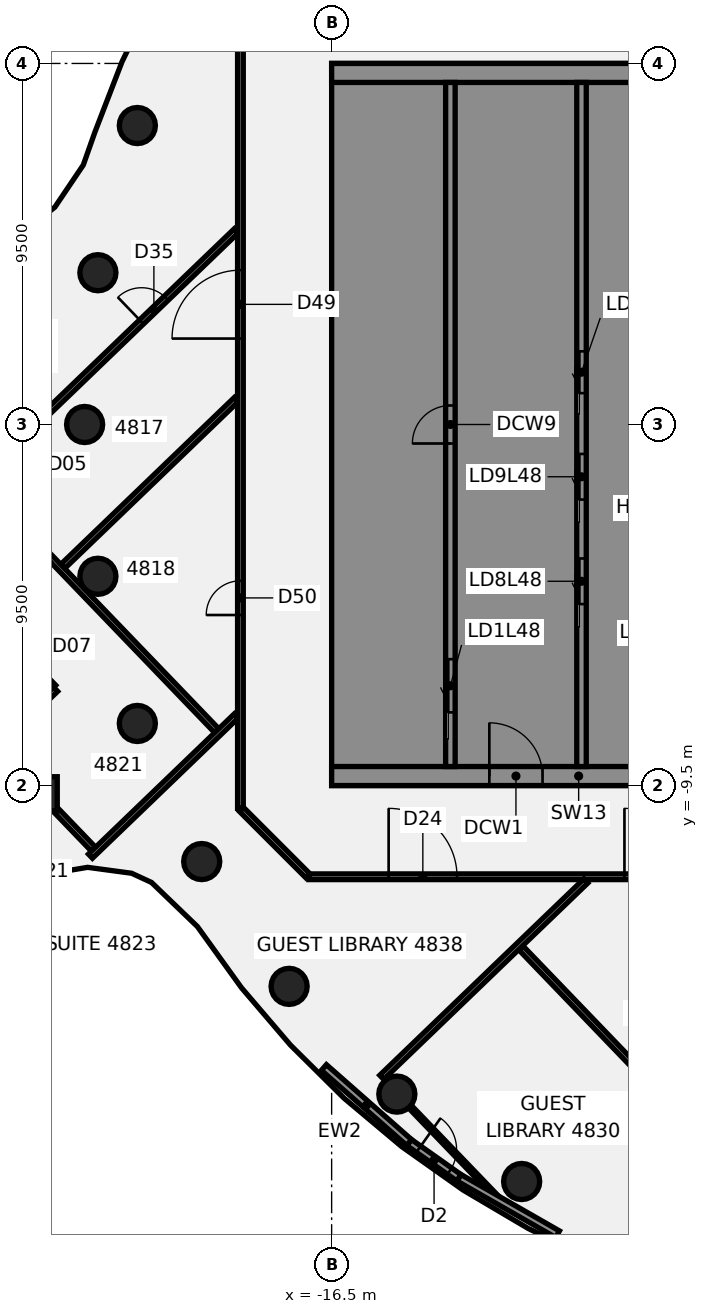
"""IFC4 building model, lengths in metres.
Left out: names, types, materials, properties, quantities, classifications, styles, units other than length and angle.
Written with IfcOpenShell. Run it as: python <this file> out.ifc"""

import sys

from ifc_helpers import new_model, si_unit, direction, frame, frame_2d, origin, origin_2d, place, context, subcontext, project, spatial, polyline, rectangle, circle, outline, extrude, element, fill, save


model = new_model("IFC4")
c1 = context("Model", 3, precision=1e-05, world=origin(), true_north=direction((0.0, 1.0)))
c2 = subcontext(c1, "Body", "Model", "MODEL_VIEW")
j1 = project(units=[si_unit("LENGTHUNIT", "METRE"), si_unit("PLANEANGLEUNIT", "RADIAN")], contexts=[c1])
p1 = place(None, origin())
s1 = spatial("IfcSite", under=j1, at=p1, CompositionType="ELEMENT")
p2 = place(p1, origin())
s2 = spatial("IfcBuilding", under=s1, at=p2, CompositionType="ELEMENT")
p3 = place(p2, frame((0.0, 0.0, 193.3)))
s3 = spatial("IfcBuildingStorey", under=s2, at=p3, CompositionType="ELEMENT", Elevation=193.3)
for number, where, z_axis, x_axis in (
    (1, (-21.613, 7.866, -0.14), (0.0, 0.0, 1.0), (1.0, 0.0, 0.0)),
    (2, (-22.651, 3.994, -0.14), (0.0, 0.0, 1.0), (1.0, 0.0, 0.0)),
    (3, (-23.0, 0.0, -0.14), (0.0, 0.0, 1.0), (1.0, 0.0, 0.0)),
    (4, (-22.651, -3.994, -0.14), (0.0, 0.0, 1.0), (1.0, 0.0, 0.0)),
    (5, (-21.613, -7.866, -0.14), (0.0, 0.0, 1.0), (1.0, 0.0, 0.0)),
    (6, (-19.919, -11.5, -0.14), (0.0, 0.0, 1.0), (1.0, 0.0, 0.0)),
    (7, (-17.619, -14.784, -0.14), (0.0, 0.0, 1.0), (1.0, 0.0, 0.0)),
    (8, (-14.784, -17.619, -0.14), (0.0, 0.0, 1.0), (1.0, 0.0, 0.0)),
    (9, (-11.5, -19.919, -0.14), (0.0, 0.0, 1.0), (1.0, 0.0, 0.0)),
):
    element("IfcColumn", number, at=place(p3, frame(where, z_axis=z_axis, x_axis=x_axis)), inside=s3, PredefinedType="COLUMN", context=c2, shape_type="SweptSolid", body=[
        extrude(circle(Radius=0.475, at=origin_2d()), origin(), (0.0, 0.0, 1.0), 3.6),
    ])
p4 = place(p3, frame((-24.17, -9.718, -0.139), z_axis=(0.04927561345, -0.010573584179, 0.998729249215), x_axis=(-0.691569981719, 0.721101561283, 0.041755223636)))
e10 = element("IfcColumn", 10, at=p4, inside=s3, PredefinedType="COLUMN", context=c2, shape_type="SweptSolid", body=[
    extrude(rectangle(XDim=0.9, YDim=0.9, at=origin_2d()), origin(), (0.0, 0.0, 1.0), 3.602),
])
p5 = place(p3, frame((-29.383, 2.194, 0.0), z_axis=(0.0, 0.0, 1.0), x_axis=(0.693158469728, -0.720785221716, 0.0)))
e11 = element("IfcWall", 11, at=p5, inside=s3, PredefinedType="PARTITIONING", context=c2, shape_type="SweptSolid", body=[
    extrude(rectangle(XDim=14.219, YDim=0.15, at=frame_2d((7.109, 0.0))), origin(), (0.0, 0.0, 1.0), 2.864),
])
p6 = place(p5, frame((5.799, 0.0, 0.0)))
e12 = element("IfcOpeningElement", 12, at=p6, cuts=e11, PredefinedType="OPENING", context=c2, shape_type="SweptSolid", body=[
    extrude(rectangle(XDim=1.4, YDim=2.1, at=frame_2d((0.7, 1.05))), frame((0.0, 0.085, 0.0), z_axis=(0.0, -1.0, 0.0), x_axis=(1.0, 0.0, 0.0)), (0.0, 0.0, 1.0), 0.17),
])
p7 = place(p3, frame((-23.748, -10.155, 0.0), z_axis=(0.0, 0.0, 1.0), x_axis=(0.693409155662, -0.720544060308, 0.0)))
e13 = element("IfcWall", 13, at=p7, inside=s3, PredefinedType="PARTITIONING", context=c2, shape_type="SweptSolid", body=[
    extrude(rectangle(XDim=1.413, YDim=0.15, at=frame_2d((0.706, 0.0))), origin(), (0.0, 0.0, 1.0), 2.864),
])
p8 = place(p3, frame((-25.51, -5.151, 0.0), z_axis=(0.0, 0.0, 1.0), x_axis=(0.69314064678, -0.720802361109, 0.0)))
e14 = element("IfcWall", 14, at=p8, inside=s3, PredefinedType="PARTITIONING", context=c2, shape_type="SweptSolid", body=[
    extrude(rectangle(XDim=2.445, YDim=0.15, at=frame_2d((1.222, 0.0))), origin(), (0.0, 0.0, 1.0), 2.864),
])
p9 = place(p8, frame((0.52, 0.0, 0.0)))
e15 = element("IfcOpeningElement", 15, at=p9, cuts=e14, PredefinedType="OPENING", context=c2, shape_type="SweptSolid", body=[
    extrude(rectangle(XDim=0.9, YDim=2.1, at=frame_2d((0.45, 1.05))), frame((0.0, 0.085, 0.0), z_axis=(0.0, -1.0, 0.0), x_axis=(1.0, 0.0, 0.0)), (0.0, 0.0, 1.0), 0.17),
])
p10 = place(p3, frame((-14.446, -17.943, 0.0), z_axis=(0.0, 0.0, 1.0), x_axis=(0.693080436315, -0.720860256081, 0.0)))
e16 = element("IfcWall", 16, at=p10, inside=s3, PredefinedType="PARTITIONING", context=c2, shape_type="SweptSolid", body=[
    extrude(rectangle(XDim=3.278, YDim=0.1, at=frame_2d((1.639, 0.0))), origin(), (0.0, 0.0, 1.0), 2.864),
])
p11 = place(p3, frame((-11.522, -13.769, 0.0), z_axis=(0.0, 0.0, 1.0), x_axis=(0.693150251381, -0.720793124974, 0.0)))
e17 = element("IfcWall", 17, at=p11, inside=s3, PredefinedType="PARTITIONING", context=c2, shape_type="SweptSolid", body=[
    extrude(rectangle(XDim=17.62, YDim=0.15, at=frame_2d((8.81, 0.0))), origin(), (0.0, 0.0, 1.0), 2.864),
])
p12 = place(p11, frame((9.22, 0.0, 0.0)))
e18 = element("IfcOpeningElement", 18, at=p12, cuts=e17, PredefinedType="OPENING", context=c2, shape_type="SweptSolid", body=[
    extrude(rectangle(XDim=1.8, YDim=2.1, at=frame_2d((0.9, 1.05))), frame((0.0, 0.085, 0.0), z_axis=(0.0, -1.0, 0.0), x_axis=(1.0, 0.0, 0.0)), (0.0, 0.0, 1.0), 0.17),
])
p13 = place(p3, frame((-18.872, -10.128, 0.0), z_axis=(0.0, 0.0, 1.0), x_axis=(0.707106781187, -0.707106781187, 0.0)))
e19 = element("IfcWall", 19, at=p13, inside=s3, PredefinedType="PARTITIONING", context=c2, shape_type="SweptSolid", body=[
    extrude(rectangle(XDim=2.465, YDim=0.15, at=frame_2d((1.232, 0.0))), origin(), (0.0, 0.0, 1.0), 2.864),
])
p14 = place(p3, frame((-17.1, -11.9, 0.0), z_axis=(0.0, 0.0, 1.0), x_axis=(1.0, 0.0, 0.0)))
e20 = element("IfcWall", 20, at=p14, inside=s3, PredefinedType="PARTITIONING", context=c2, shape_type="SweptSolid", body=[
    extrude(rectangle(XDim=34.165, YDim=0.15, at=frame_2d((17.083, 0.0))), origin(), (0.0, 0.0, 1.0), 2.864),
])
p15 = place(p14, frame((8.305, 0.0, 0.0)))
e21 = element("IfcOpeningElement", 21, at=p15, cuts=e20, PredefinedType="OPENING", context=c2, shape_type="SweptSolid", body=[
    extrude(rectangle(XDim=1.8, YDim=2.1, at=frame_2d((0.9, 1.05))), frame((0.0, 0.085, 0.0), z_axis=(0.0, -1.0, 0.0), x_axis=(1.0, 0.0, 0.0)), (0.0, 0.0, 1.0), 0.17),
])
p16 = place(p14, frame((2.1, 0.0, 0.0)))
e22 = element("IfcOpeningElement", 22, at=p16, cuts=e20, PredefinedType="OPENING", context=c2, shape_type="SweptSolid", body=[
    extrude(rectangle(XDim=1.8, YDim=2.1, at=frame_2d((0.9, 1.05))), frame((0.0, 0.085, 0.0), z_axis=(0.0, -1.0, 0.0), x_axis=(1.0, 0.0, 0.0)), (0.0, 0.0, 1.0), 0.17),
])
p17 = place(p14, frame((25.131, 0.0, 0.0)))
e23 = element("IfcOpeningElement", 23, at=p17, cuts=e20, PredefinedType="OPENING", context=c2, shape_type="SweptSolid", body=[
    extrude(rectangle(XDim=1.8, YDim=2.1, at=frame_2d((0.9, 1.05))), frame((0.0, 0.085, 0.0), z_axis=(0.0, -1.0, 0.0), x_axis=(1.0, 0.0, 0.0)), (0.0, 0.0, 1.0), 0.17),
])
p18 = place(p3, frame((-26.933, -10.018, 0.0), z_axis=(0.0, 0.0, 1.0), x_axis=(0.720842661117, 0.693098736049, 0.0)))
e24 = element("IfcWall", 24, at=p18, inside=s3, PredefinedType="PARTITIONING", context=c2, shape_type="SweptSolid", body=[
    extrude(rectangle(XDim=4.4, YDim=0.15, at=frame_2d((2.2, 0.0))), origin(), (0.0, 0.0, 1.0), 2.864),
])
p19 = place(p3, frame((-25.79, -1.426, 0.0), z_axis=(0.0, 0.0, 1.0), x_axis=(0.720775227716, 0.693168861903, 0.0)))
e25 = element("IfcWall", 25, at=p19, inside=s3, PredefinedType="PARTITIONING", context=c2, shape_type="SweptSolid", body=[
    extrude(rectangle(XDim=9.41, YDim=0.15, at=frame_2d((4.705, 0.0))), origin(), (0.0, 0.0, 1.0), 2.864),
])
p20 = place(p19, frame((5.95, 0.0, 0.0)))
e26 = element("IfcOpeningElement", 26, at=p20, cuts=e25, PredefinedType="OPENING", context=c2, shape_type="SweptSolid", body=[
    extrude(rectangle(XDim=0.9, YDim=2.1, at=frame_2d((0.45, 1.05))), frame((0.0, 0.085, 0.0), z_axis=(0.0, -1.0, 0.0), x_axis=(1.0, 0.0, 0.0)), (0.0, 0.0, 1.0), 0.17),
])
p21 = place(p3, frame((-23.572, -3.732, 0.0), z_axis=(0.0, 0.0, 1.0), x_axis=(0.720832323981, 0.693109486809, 0.0)))
e27 = element("IfcWall", 27, at=p21, inside=s3, PredefinedType="PARTITIONING", context=c2, shape_type="SweptSolid", body=[
    extrude(rectangle(XDim=6.332, YDim=0.15, at=frame_2d((3.166, 0.0))), origin(), (0.0, 0.0, 1.0), 2.864),
])
p22 = place(p3, frame((-22.846, -11.358, 0.0), z_axis=(0.0, 0.0, 1.0), x_axis=(0.720771395378, 0.693172846846, 0.0)))
e28 = element("IfcWall", 28, at=p22, inside=s3, PredefinedType="PARTITIONING", context=c2, shape_type="SweptSolid", body=[
    extrude(rectangle(XDim=5.325, YDim=0.15, at=frame_2d((2.663, 0.0))), origin(), (0.0, 0.0, 1.0), 2.864),
])
p23 = place(p3, frame((-15.182, -17.177, 0.0), z_axis=(0.0, 0.0, 1.0), x_axis=(0.720763816656, 0.693180727227, 0.0)))
e29 = element("IfcWall", 29, at=p23, inside=s3, PredefinedType="PARTITIONING", context=c2, shape_type="SweptSolid", body=[
    extrude(rectangle(XDim=7.453, YDim=0.15, at=frame_2d((3.726, 0.0))), origin(), (0.0, 0.0, 1.0), 2.864),
])
p24 = place(p3, frame((-18.9, -10.1, 0.0), z_axis=(0.0, 0.0, 1.0), x_axis=(0.0, 1.0, 0.0)))
e30 = element("IfcWall", 30, at=p24, inside=s3, PredefinedType="PARTITIONING", context=c2, shape_type="SweptSolid", body=[
    extrude(rectangle(XDim=20.2, YDim=0.15, at=frame_2d((10.1, 0.0))), origin(), (0.0, 0.0, 1.0), 2.864),
])
p25 = place(p24, frame((12.361, 0.0, 0.0)))
e31 = element("IfcOpeningElement", 31, at=p25, cuts=e30, PredefinedType="OPENING", context=c2, shape_type="SweptSolid", body=[
    extrude(rectangle(XDim=1.8, YDim=2.1, at=frame_2d((0.9, 1.05))), frame((0.0, 0.085, 0.0), z_axis=(0.0, -1.0, 0.0), x_axis=(1.0, 0.0, 0.0)), (0.0, 0.0, 1.0), 0.17),
])
p26 = place(p24, frame((5.087, 0.0, 0.0)))
e32 = element("IfcOpeningElement", 32, at=p26, cuts=e30, PredefinedType="OPENING", context=c2, shape_type="SweptSolid", body=[
    extrude(rectangle(XDim=0.9, YDim=2.1, at=frame_2d((0.45, 1.05))), frame((0.0, 0.085, 0.0), z_axis=(0.0, -1.0, 0.0), x_axis=(1.0, 0.0, 0.0)), (0.0, 0.0, 1.0), 0.17),
])
p27 = place(p3, frame((-16.704, -16.919, 0.0), z_axis=(0.0, 0.0, 1.0), x_axis=(0.750789592243, -0.660541435627, 0.0)))
e33 = element("IfcWall", 33, at=p27, inside=s3, PredefinedType="SOLIDWALL", context=c2, shape_type="SweptSolid", body=[
    extrude(rectangle(XDim=2.992, YDim=0.2, at=frame_2d((1.496, 0.0))), origin(), (0.0, 0.0, 1.0), 3.46),
])
p28 = place(p3, frame((-13.151, -19.82, 0.0), z_axis=(0.0, 0.0, 1.0), x_axis=(0.867966774953, -0.496622268508, 0.0)))
e34 = element("IfcWall", 34, at=p28, inside=s3, PredefinedType="SOLIDWALL", context=c2, shape_type="SweptSolid", body=[
    extrude(rectangle(XDim=2.991, YDim=0.2, at=frame_2d((1.496, 0.0))), origin(), (0.0, 0.0, 1.0), 3.46),
])
p29 = place(p3, frame((-14.458, -18.896, 0.0), z_axis=(0.0, 0.0, 1.0), x_axis=(0.816354223939, -0.57755153974, 0.0)))
e35 = element("IfcWall", 35, at=p29, inside=s3, PredefinedType="SOLIDWALL", context=c2, shape_type="SweptSolid", body=[
    extrude(rectangle(XDim=1.6, YDim=0.2, at=frame_2d((0.8, 0.0))), origin(), (0.0, 0.0, 1.0), 3.46),
])
p30 = place(p29, frame((0.3, 0.0, 0.0)))
e36 = element("IfcOpeningElement", 36, at=p30, cuts=e35, PredefinedType="OPENING", context=c2, shape_type="SweptSolid", body=[
    extrude(rectangle(XDim=1.0, YDim=2.4, at=frame_2d((0.5, 1.2))), frame((0.0, 0.11, 0.0), z_axis=(0.0, -1.0, 0.0), x_axis=(1.0, 0.0, 0.0)), (0.0, 0.0, 1.0), 0.22),
])
p31 = place(p3, frame((-16.5, -9.25, 0.0), z_axis=(0.0, 0.0, 1.0), x_axis=(1.0, 0.0, 0.0)))
e37 = element("IfcWall", 37, at=p31, inside=s3, PredefinedType="SHEAR", context=c2, shape_type="SweptSolid", body=[
    extrude(rectangle(XDim=13.0, YDim=0.5, at=frame_2d((6.5, 0.0))), origin(), (0.0, 0.0, 1.0), 3.46),
])
p32 = place(p31, frame((4.15, 0.0, 0.0)))
e38 = element("IfcOpeningElement", 38, at=p32, cuts=e37, PredefinedType="OPENING", context=c2, shape_type="SweptSolid", body=[
    extrude(rectangle(XDim=1.4, YDim=2.1, at=frame_2d((0.7, 1.05))), frame((0.0, 0.26, 0.0), z_axis=(0.0, -1.0, 0.0), x_axis=(1.0, 0.0, 0.0)), (0.0, 0.0, 1.0), 0.52),
])
p33 = place(p31, frame((10.125, 0.0, 0.0)))
e39 = element("IfcOpeningElement", 39, at=p33, cuts=e37, PredefinedType="OPENING", context=c2, shape_type="SweptSolid", body=[
    extrude(rectangle(XDim=1.4, YDim=2.1, at=frame_2d((0.7, 1.05))), frame((0.0, 0.26, 0.0), z_axis=(0.0, -1.0, 0.0), x_axis=(1.0, 0.0, 0.0)), (0.0, 0.0, 1.0), 0.52),
])
p34 = place(p3, origin())
e40 = element("IfcWall", 40, at=p34, inside=s3, PredefinedType="SHEAR", context=c2, shape_type="SweptSolid", body=[
    extrude(outline(polyline([(-13.5, -8.125), (-16.0, -8.125), (-16.0, -5.625), (-13.5, -5.625), (-13.5, -5.375), (-16.0, -5.375), (-16.0, 5.375), (-13.5, 5.375), (-13.5, 5.625), (-16.0, 5.625), (-16.0, 8.125), (-13.5, 8.125), (-13.5, 9.0), (-16.0, 9.0), (-16.5, 9.0), (-16.5, -9.0), (-16.0, -9.0), (-13.5, -9.0), (-13.5, -8.125)])), origin(), (0.0, 0.0, 1.0), 3.46),
])
p35 = place(p3, frame((-16.5, 9.25, 0.0), z_axis=(0.0, 0.0, 1.0), x_axis=(1.0, 0.0, 0.0)))
e41 = element("IfcWall", 41, at=p35, inside=s3, PredefinedType="SHEAR", context=c2, shape_type="SweptSolid", body=[
    extrude(rectangle(XDim=13.0, YDim=0.5, at=frame_2d((6.5, 0.0))), origin(), (0.0, 0.0, 1.0), 3.46),
])
p36 = place(p3, origin())
e42 = element("IfcWall", 42, at=p36, inside=s3, PredefinedType="SHEAR", context=c2, shape_type="SweptSolid", body=[
    extrude(outline(polyline([(-9.8, -5.375), (-9.8, -5.625), (-7.5, -5.625), (-7.25, -5.625), (-7.25, 9.0), (-7.5, 9.0), (-9.8, 9.0), (-9.8, 8.125), (-7.5, 8.125), (-7.5, 5.625), (-9.8, 5.625), (-9.8, 5.375), (-7.5, 5.375), (-7.5, 2.875), (-9.8, 2.875), (-9.8, 2.625), (-7.5, 2.625), (-7.5, 0.125), (-9.8, 0.125), (-9.8, -0.125), (-7.5, -0.125), (-7.5, -2.625), (-9.8, -2.625), (-9.8, -2.875), (-7.5, -2.875), (-7.5, -5.375), (-9.8, -5.375)])), origin(), (0.0, 0.0, 1.0), 3.46),
])
p37 = place(p3, origin())
e43 = element("IfcWall", 43, at=p37, inside=s3, PredefinedType="SHEAR", context=c2, shape_type="SweptSolid", body=[
    extrude(outline(polyline([(-7.5, -8.125), (-9.55, -8.125), (-9.55, -5.625), (-9.8, -5.625), (-9.8, -8.125), (-9.8, -9.0), (-7.5, -9.0), (-7.5, -8.125)])), origin(), (0.0, 0.0, 1.0), 3.46),
])
p38 = place(p3, frame((-13.375, -9.0, 0.0), z_axis=(0.0, 0.0, 1.0), x_axis=(0.0, 1.0, 0.0)))
e44 = element("IfcWall", 44, at=p38, inside=s3, PredefinedType="SHEAR", context=c2, shape_type="SweptSolid", body=[
    extrude(rectangle(XDim=18.0, YDim=0.25, at=frame_2d((9.0, 0.0))), origin(), (0.0, 0.0, 1.0), 3.46),
])
p39 = place(p38, frame((1.425, 0.0, 0.0)))
e45 = element("IfcOpeningElement", 45, at=p39, cuts=e44, PredefinedType="OPENING", context=c2, shape_type="SweptSolid", body=[
    extrude(rectangle(XDim=1.4, YDim=2.1, at=frame_2d((0.7, 1.05))), frame((0.0, 0.135, 0.0), z_axis=(0.0, -1.0, 0.0), x_axis=(1.0, 0.0, 0.0)), (0.0, 0.0, 1.0), 0.27),
])
p40 = place(p38, frame((8.5, 0.0, 0.0)))
e46 = element("IfcOpeningElement", 46, at=p40, cuts=e44, PredefinedType="OPENING", context=c2, shape_type="SweptSolid", body=[
    extrude(rectangle(XDim=1.0, YDim=2.1, at=frame_2d((0.5, 1.05))), frame((0.0, 0.135, 0.0), z_axis=(0.0, -1.0, 0.0), x_axis=(1.0, 0.0, 0.0)), (0.0, 0.0, 1.0), 0.27),
])
p41 = place(p3, frame((-9.925, -9.0, 0.0), z_axis=(0.0, 0.0, 1.0), x_axis=(0.0, 1.0, 0.0)))
e47 = element("IfcWall", 47, at=p41, inside=s3, PredefinedType="SHEAR", context=c2, shape_type="SweptSolid", body=[
    extrude(rectangle(XDim=18.0, YDim=0.25, at=frame_2d((9.0, 0.0))), origin(), (0.0, 0.0, 1.0), 3.46),
])
p42 = place(p41, frame((4.275, 0.0, 0.0)))
e48 = element("IfcOpeningElement", 48, at=p42, cuts=e47, PredefinedType="OPENING", context=c2, shape_type="SweptSolid", body=[
    extrude(rectangle(XDim=1.2, YDim=2.1, at=frame_2d((0.6, 1.05))), frame((0.0, 0.135, 0.0), z_axis=(0.0, -1.0, 0.0), x_axis=(1.0, 0.0, 0.0)), (0.0, 0.0, 1.0), 0.27),
])
p43 = place(p41, frame((7.025, 0.0, 0.0)))
e49 = element("IfcOpeningElement", 49, at=p43, cuts=e47, PredefinedType="OPENING", context=c2, shape_type="SweptSolid", body=[
    extrude(rectangle(XDim=1.2, YDim=2.1, at=frame_2d((0.6, 1.05))), frame((0.0, 0.135, 0.0), z_axis=(0.0, -1.0, 0.0), x_axis=(1.0, 0.0, 0.0)), (0.0, 0.0, 1.0), 0.27),
])
p44 = place(p41, frame((9.825, 0.0, 0.0)))
e50 = element("IfcOpeningElement", 50, at=p44, cuts=e47, PredefinedType="OPENING", context=c2, shape_type="SweptSolid", body=[
    extrude(rectangle(XDim=1.1, YDim=2.1, at=frame_2d((0.55, 1.05))), frame((0.0, 0.135, 0.0), z_axis=(0.0, -1.0, 0.0), x_axis=(1.0, 0.0, 0.0)), (0.0, 0.0, 1.0), 0.27),
])
p45 = place(p15, origin())
e51 = element("IfcDoor", 51, at=p45, inside=s3, OperationType="DOUBLE_DOOR_SINGLE_SWING", PredefinedType="DOOR", context=c2, shape_type="SweptSolid", body=[
    extrude(rectangle(XDim=1.8, YDim=2.1, at=frame_2d((0.9, 1.05))), frame((0.0, 0.025, 0.0), z_axis=(0.0, -1.0, 0.0), x_axis=(1.0, 0.0, 0.0)), (0.0, 0.0, 1.0), 0.05),
])
fill(e21, e51)
p46 = place(p16, frame((1.8, 0.0, 0.0), z_axis=(0.0, 0.0, 1.0), x_axis=(-1.0, 0.0, 0.0)))
e52 = element("IfcDoor", 52, at=p46, inside=s3, OperationType="DOUBLE_DOOR_SINGLE_SWING", PredefinedType="DOOR", context=c2, shape_type="SweptSolid", body=[
    extrude(rectangle(XDim=1.8, YDim=2.1, at=frame_2d((0.9, 1.05))), frame((0.0, 0.025, 0.0), z_axis=(0.0, -1.0, 0.0), x_axis=(1.0, 0.0, 0.0)), (0.0, 0.0, 1.0), 0.05),
])
fill(e22, e52)
p47 = place(p20, origin())
e53 = element("IfcDoor", 53, at=p47, inside=s3, OperationType="SINGLE_SWING_LEFT", PredefinedType="DOOR", context=c2, shape_type="SweptSolid", body=[
    extrude(rectangle(XDim=0.9, YDim=2.1, at=frame_2d((0.45, 1.05))), frame((0.0, 0.025, 0.0), z_axis=(0.0, -1.0, 0.0), x_axis=(1.0, 0.0, 0.0)), (0.0, 0.0, 1.0), 0.05),
])
fill(e26, e53)
p48 = place(p25, frame((1.8, 0.0, 0.0), z_axis=(0.0, 0.0, 1.0), x_axis=(-1.0, 0.0, 0.0)))
e54 = element("IfcDoor", 54, at=p48, inside=s3, OperationType="DOUBLE_DOOR_SINGLE_SWING", PredefinedType="DOOR", context=c2, shape_type="SweptSolid", body=[
    extrude(rectangle(XDim=1.8, YDim=2.1, at=frame_2d((0.9, 1.05))), frame((0.0, 0.025, 0.0), z_axis=(0.0, -1.0, 0.0), x_axis=(1.0, 0.0, 0.0)), (0.0, 0.0, 1.0), 0.05),
])
fill(e31, e54)
p49 = place(p26, origin())
e55 = element("IfcDoor", 55, at=p49, inside=s3, OperationType="SINGLE_SWING_RIGHT", PredefinedType="DOOR", context=c2, shape_type="SweptSolid", body=[
    extrude(rectangle(XDim=0.9, YDim=2.1, at=frame_2d((0.45, 1.05))), frame((0.0, 0.025, 0.0), z_axis=(0.0, -1.0, 0.0), x_axis=(1.0, 0.0, 0.0)), (0.0, 0.0, 1.0), 0.05),
])
fill(e32, e55)
p50 = place(p30, origin())
e56 = element("IfcDoor", 56, at=p50, inside=s3, OperationType="SINGLE_SWING_LEFT", PredefinedType="DOOR", context=c2, shape_type="SweptSolid", body=[
    extrude(rectangle(XDim=1.0, YDim=2.4, at=frame_2d((0.5, 1.2))), frame((0.0, 0.025, 0.0), z_axis=(0.0, -1.0, 0.0), x_axis=(1.0, 0.0, 0.0)), (0.0, 0.0, 1.0), 0.05),
])
fill(e36, e56)
p51 = place(p32, origin())
e57 = element("IfcDoor", 57, at=p51, inside=s3, OperationType="SINGLE_SWING_LEFT", PredefinedType="DOOR", context=c2, shape_type="SweptSolid", body=[
    extrude(rectangle(XDim=1.4, YDim=2.1, at=frame_2d((0.7, 1.05))), frame((0.0, 0.025, 0.0), z_axis=(0.0, -1.0, 0.0), x_axis=(1.0, 0.0, 0.0)), (0.0, 0.0, 1.0), 0.05),
])
fill(e38, e57)
p52 = place(p39, origin())
e58 = element("IfcDoor", 58, at=p52, inside=s3, OperationType="SLIDING_TO_LEFT", PredefinedType="DOOR", context=c2, shape_type="SweptSolid", body=[
    extrude(rectangle(XDim=1.4, YDim=2.1, at=frame_2d((0.7, 1.05))), frame((0.0, 0.025, 0.0), z_axis=(0.0, -1.0, 0.0), x_axis=(1.0, 0.0, 0.0)), (0.0, 0.0, 1.0), 0.05),
])
fill(e45, e58)
p53 = place(p42, origin())
e59 = element("IfcDoor", 59, at=p53, inside=s3, OperationType="SLIDING_TO_LEFT", PredefinedType="DOOR", context=c2, shape_type="SweptSolid", body=[
    extrude(rectangle(XDim=1.2, YDim=2.1, at=frame_2d((0.6, 1.05))), frame((0.0, 0.025, 0.0), z_axis=(0.0, -1.0, 0.0), x_axis=(1.0, 0.0, 0.0)), (0.0, 0.0, 1.0), 0.05),
])
fill(e48, e59)
p54 = place(p43, origin())
e60 = element("IfcDoor", 60, at=p54, inside=s3, OperationType="SLIDING_TO_LEFT", PredefinedType="DOOR", context=c2, shape_type="SweptSolid", body=[
    extrude(rectangle(XDim=1.2, YDim=2.1, at=frame_2d((0.6, 1.05))), frame((0.0, 0.025, 0.0), z_axis=(0.0, -1.0, 0.0), x_axis=(1.0, 0.0, 0.0)), (0.0, 0.0, 1.0), 0.05),
])
fill(e49, e60)
p55 = place(p44, origin())
e61 = element("IfcDoor", 61, at=p55, inside=s3, OperationType="SLIDING_TO_LEFT", PredefinedType="DOOR", context=c2, shape_type="SweptSolid", body=[
    extrude(rectangle(XDim=1.1, YDim=2.1, at=frame_2d((0.55, 1.05))), frame((0.0, 0.025, 0.0), z_axis=(0.0, -1.0, 0.0), x_axis=(1.0, 0.0, 0.0)), (0.0, 0.0, 1.0), 0.05),
])
fill(e50, e61)
p56 = place(p40, origin())
e62 = element("IfcDoor", 62, at=p56, inside=s3, OperationType="SINGLE_SWING_LEFT", PredefinedType="DOOR", context=c2, shape_type="SweptSolid", body=[
    extrude(rectangle(XDim=1.0, YDim=2.1, at=frame_2d((0.5, 1.05))), frame((0.0, 0.025, 0.0), z_axis=(0.0, -1.0, 0.0), x_axis=(1.0, 0.0, 0.0)), (0.0, 0.0, 1.0), 0.05),
])
fill(e46, e62)
save(model, sys.argv[1])
